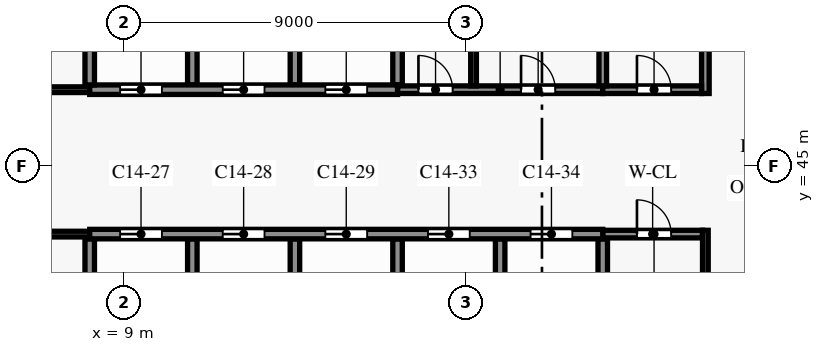
"""IFC4 building model, lengths in metres.
Left out: names, types, materials, properties, quantities, classifications, styles, units other than length and angle.
Written with IfcOpenShell. Run it as: python <this file> out.ifc"""

import sys

from ifc_helpers import new_model, si_unit, direction, frame, frame_2d, origin, place, context, subcontext, project, spatial, rectangle, extrude, element, fill, save


model = new_model("IFC4")
c1 = context("Model", 3, precision=1e-05, world=origin(), true_north=direction((0.0, 1.0)))
c2 = subcontext(c1, "Body", "Model", "MODEL_VIEW")
j1 = project(units=[si_unit("LENGTHUNIT", "METRE"), si_unit("PLANEANGLEUNIT", "RADIAN")], contexts=[c1])
p1 = place(None, origin())
s1 = spatial("IfcSite", under=j1, at=p1, CompositionType="ELEMENT")
p2 = place(p1, origin())
s2 = spatial("IfcBuilding", under=s1, at=p2, CompositionType="ELEMENT")
p3 = place(p2, frame((0.0, 0.0, 92.3)))
s3 = spatial("IfcBuildingStorey", under=s2, at=p3, CompositionType="ELEMENT", Elevation=92.3)
p4 = place(p3, frame((21.6, 43.2, 0.0), z_axis=(0.0, 0.0, 1.0), x_axis=(1.0, 0.0, 0.0)))
e1 = element("IfcWall", 1, at=p4, inside=s3, PredefinedType="PARTITIONING", context=c2, shape_type="SweptSolid", body=[
    extrude(rectangle(XDim=2.625, YDim=0.2, at=frame_2d((1.312, 0.0))), origin(), (0.0, 0.0, 1.0), 3.5),
])
p5 = place(p4, frame((0.9, 0.0, 0.0)))
e2 = element("IfcOpeningElement", 2, at=p5, cuts=e1, PredefinedType="OPENING", context=c2, shape_type="SweptSolid", body=[
    extrude(rectangle(XDim=0.9, YDim=2.1, at=frame_2d((0.45, 1.05))), frame((0.0, 0.11, 0.0), z_axis=(0.0, -1.0, 0.0), x_axis=(1.0, 0.0, 0.0)), (0.0, 0.0, 1.0), 0.22),
])
p6 = place(p3, frame((0.15, 43.2, 0.0), z_axis=(0.0, 0.0, 1.0), x_axis=(1.0, 0.0, 0.0)))
e3 = element("IfcWall", 3, at=p6, inside=s3, PredefinedType="PARTITIONING", context=c2, shape_type="SweptSolid", body=[
    extrude(rectangle(XDim=7.95, YDim=0.15, at=frame_2d((3.975, 0.0))), origin(), (0.0, 0.0, 1.0), 3.5),
])
p7 = place(p6, frame((0.725, 0.0, 0.0)))
e4 = element("IfcOpeningElement", 4, at=p7, cuts=e3, PredefinedType="OPENING", context=c2, shape_type="SweptSolid", body=[
    extrude(rectangle(XDim=0.9, YDim=2.1, at=frame_2d((0.45, 1.05))), frame((0.0, 0.085, 0.0), z_axis=(0.0, -1.0, 0.0), x_axis=(1.0, 0.0, 0.0)), (0.0, 0.0, 1.0), 0.17),
])
p8 = place(p6, frame((4.45, 0.0, 0.0)))
e5 = element("IfcOpeningElement", 5, at=p8, cuts=e3, PredefinedType="OPENING", context=c2, shape_type="SweptSolid", body=[
    extrude(rectangle(XDim=0.9, YDim=2.1, at=frame_2d((0.45, 1.05))), frame((0.0, 0.085, 0.0), z_axis=(0.0, -1.0, 0.0), x_axis=(1.0, 0.0, 0.0)), (0.0, 0.0, 1.0), 0.17),
])
p9 = place(p3, frame((8.1, 43.2, 0.0), z_axis=(0.0, 0.0, 1.0), x_axis=(1.0, 0.0, 0.0)))
e6 = element("IfcWall", 6, at=p9, inside=s3, PredefinedType="SHEAR", context=c2, shape_type="SweptSolid", body=[
    extrude(rectangle(XDim=13.5, YDim=0.25, at=frame_2d((6.75, 0.0))), origin(), (0.0, 0.0, 1.0), 3.5),
])
p10 = place(p9, frame((0.8, 0.0, 0.0)))
e7 = element("IfcOpeningElement", 7, at=p10, cuts=e6, PredefinedType="OPENING", context=c2, shape_type="SweptSolid", body=[
    extrude(rectangle(XDim=1.1, YDim=2.1, at=frame_2d((0.55, 1.05))), frame((0.0, 0.135, 0.0), z_axis=(0.0, -1.0, 0.0), x_axis=(1.0, 0.0, 0.0)), (0.0, 0.0, 1.0), 0.27),
])
p11 = place(p9, frame((3.5, 0.0, 0.0)))
e8 = element("IfcOpeningElement", 8, at=p11, cuts=e6, PredefinedType="OPENING", context=c2, shape_type="SweptSolid", body=[
    extrude(rectangle(XDim=1.1, YDim=2.1, at=frame_2d((0.55, 1.05))), frame((0.0, 0.135, 0.0), z_axis=(0.0, -1.0, 0.0), x_axis=(1.0, 0.0, 0.0)), (0.0, 0.0, 1.0), 0.27),
])
p12 = place(p9, frame((6.2, 0.0, 0.0)))
e9 = element("IfcOpeningElement", 9, at=p12, cuts=e6, PredefinedType="OPENING", context=c2, shape_type="SweptSolid", body=[
    extrude(rectangle(XDim=1.1, YDim=2.1, at=frame_2d((0.55, 1.05))), frame((0.0, 0.135, 0.0), z_axis=(0.0, -1.0, 0.0), x_axis=(1.0, 0.0, 0.0)), (0.0, 0.0, 1.0), 0.27),
])
p13 = place(p9, frame((8.9, 0.0, 0.0)))
e10 = element("IfcOpeningElement", 10, at=p13, cuts=e6, PredefinedType="OPENING", context=c2, shape_type="SweptSolid", body=[
    extrude(rectangle(XDim=1.1, YDim=2.1, at=frame_2d((0.55, 1.05))), frame((0.0, 0.135, 0.0), z_axis=(0.0, -1.0, 0.0), x_axis=(1.0, 0.0, 0.0)), (0.0, 0.0, 1.0), 0.27),
])
p14 = place(p9, frame((11.6, 0.0, 0.0)))
e11 = element("IfcOpeningElement", 11, at=p14, cuts=e6, PredefinedType="OPENING", context=c2, shape_type="SweptSolid", body=[
    extrude(rectangle(XDim=1.1, YDim=2.1, at=frame_2d((0.55, 1.05))), frame((0.0, 0.135, 0.0), z_axis=(0.0, -1.0, 0.0), x_axis=(1.0, 0.0, 0.0)), (0.0, 0.0, 1.0), 0.27),
])
p15 = place(p3, frame((16.2, 47.0, 0.0), z_axis=(0.0, 0.0, 1.0), x_axis=(1.0, 0.0, 0.0)))
e12 = element("IfcWall", 12, at=p15, inside=s3, PredefinedType="PARTITIONING", context=c2, shape_type="SweptSolid", body=[
    extrude(rectangle(XDim=5.4, YDim=0.2, at=frame_2d((2.7, 0.0))), origin(), (0.0, 0.0, 1.0), 3.5),
])
p16 = place(p15, frame((0.55, 0.0, 0.0)))
e13 = element("IfcOpeningElement", 13, at=p16, cuts=e12, PredefinedType="OPENING", context=c2, shape_type="SweptSolid", body=[
    extrude(rectangle(XDim=0.9, YDim=2.1, at=frame_2d((0.45, 1.05))), frame((0.0, 0.11, 0.0), z_axis=(0.0, -1.0, 0.0), x_axis=(1.0, 0.0, 0.0)), (0.0, 0.0, 1.0), 0.22),
])
p17 = place(p15, frame((3.25, 0.0, 0.0)))
e14 = element("IfcOpeningElement", 14, at=p17, cuts=e12, PredefinedType="OPENING", context=c2, shape_type="SweptSolid", body=[
    extrude(rectangle(XDim=0.9, YDim=2.1, at=frame_2d((0.45, 1.05))), frame((0.0, 0.11, 0.0), z_axis=(0.0, -1.0, 0.0), x_axis=(1.0, 0.0, 0.0)), (0.0, 0.0, 1.0), 0.22),
])
p18 = place(p3, frame((0.15, 47.0, 0.0), z_axis=(0.0, 0.0, 1.0), x_axis=(1.0, 0.0, 0.0)))
e15 = element("IfcWall", 15, at=p18, inside=s3, PredefinedType="PARTITIONING", context=c2, shape_type="SweptSolid", body=[
    extrude(rectangle(XDim=7.95, YDim=0.15, at=frame_2d((3.975, 0.0))), origin(), (0.0, 0.0, 1.0), 3.5),
])
p19 = place(p18, frame((0.725, 0.0, 0.0)))
e16 = element("IfcOpeningElement", 16, at=p19, cuts=e15, PredefinedType="OPENING", context=c2, shape_type="SweptSolid", body=[
    extrude(rectangle(XDim=0.9, YDim=2.1, at=frame_2d((0.45, 1.05))), frame((0.0, 0.085, 0.0), z_axis=(0.0, -1.0, 0.0), x_axis=(1.0, 0.0, 0.0)), (0.0, 0.0, 1.0), 0.17),
])
p20 = place(p18, frame((4.45, 0.0, 0.0)))
e17 = element("IfcOpeningElement", 17, at=p20, cuts=e15, PredefinedType="OPENING", context=c2, shape_type="SweptSolid", body=[
    extrude(rectangle(XDim=0.9, YDim=2.1, at=frame_2d((0.45, 1.05))), frame((0.0, 0.085, 0.0), z_axis=(0.0, -1.0, 0.0), x_axis=(1.0, 0.0, 0.0)), (0.0, 0.0, 1.0), 0.17),
])
p21 = place(p3, frame((21.6, 47.0, 0.0), z_axis=(0.0, 0.0, 1.0), x_axis=(1.0, 0.0, 0.0)))
e18 = element("IfcWall", 18, at=p21, inside=s3, PredefinedType="PARTITIONING", context=c2, shape_type="SweptSolid", body=[
    extrude(rectangle(XDim=2.6, YDim=0.2, at=frame_2d((1.3, 0.0))), origin(), (0.0, 0.0, 1.0), 3.5),
])
p22 = place(p21, frame((0.9, 0.0, 0.0)))
e19 = element("IfcOpeningElement", 19, at=p22, cuts=e18, PredefinedType="OPENING", context=c2, shape_type="SweptSolid", body=[
    extrude(rectangle(XDim=0.9, YDim=2.1, at=frame_2d((0.45, 1.05))), frame((0.0, 0.11, 0.0), z_axis=(0.0, -1.0, 0.0), x_axis=(1.0, 0.0, 0.0)), (0.0, 0.0, 1.0), 0.22),
])
p23 = place(p3, frame((8.1, 47.0, 0.0), z_axis=(0.0, 0.0, 1.0), x_axis=(1.0, 0.0, 0.0)))
e20 = element("IfcWall", 20, at=p23, inside=s3, PredefinedType="SHEAR", context=c2, shape_type="SweptSolid", body=[
    extrude(rectangle(XDim=8.1, YDim=0.25, at=frame_2d((4.05, 0.0))), origin(), (0.0, 0.0, 1.0), 3.5),
])
p24 = place(p23, frame((0.8, 0.0, 0.0)))
e21 = element("IfcOpeningElement", 21, at=p24, cuts=e20, PredefinedType="OPENING", context=c2, shape_type="SweptSolid", body=[
    extrude(rectangle(XDim=1.1, YDim=2.1, at=frame_2d((0.55, 1.05))), frame((0.0, 0.135, 0.0), z_axis=(0.0, -1.0, 0.0), x_axis=(1.0, 0.0, 0.0)), (0.0, 0.0, 1.0), 0.27),
])
p25 = place(p23, frame((3.5, 0.0, 0.0)))
e22 = element("IfcOpeningElement", 22, at=p25, cuts=e20, PredefinedType="OPENING", context=c2, shape_type="SweptSolid", body=[
    extrude(rectangle(XDim=1.1, YDim=2.1, at=frame_2d((0.55, 1.05))), frame((0.0, 0.135, 0.0), z_axis=(0.0, -1.0, 0.0), x_axis=(1.0, 0.0, 0.0)), (0.0, 0.0, 1.0), 0.27),
])
p26 = place(p23, frame((6.2, 0.0, 0.0)))
e23 = element("IfcOpeningElement", 23, at=p26, cuts=e20, PredefinedType="OPENING", context=c2, shape_type="SweptSolid", body=[
    extrude(rectangle(XDim=1.1, YDim=2.1, at=frame_2d((0.55, 1.05))), frame((0.0, 0.135, 0.0), z_axis=(0.0, -1.0, 0.0), x_axis=(1.0, 0.0, 0.0)), (0.0, 0.0, 1.0), 0.27),
])
for number, where, z_axis, x_axis in (
    (24, (8.1, 40.125, 0.0), (0.0, 0.0, 1.0), (0.0, 1.0, 0.0)),
    (25, (8.1, 47.125, 0.0), (0.0, 0.0, 1.0), (0.0, 1.0, 0.0)),
    (26, (10.8, 40.125, 0.0), (0.0, 0.0, 1.0), (0.0, 1.0, 0.0)),
    (27, (10.8, 47.125, 0.0), (0.0, 0.0, 1.0), (0.0, 1.0, 0.0)),
    (28, (13.5, 40.125, 0.0), (0.0, 0.0, 1.0), (0.0, 1.0, 0.0)),
    (29, (13.5, 47.125, 0.0), (0.0, 0.0, 1.0), (0.0, 1.0, 0.0)),
    (30, (16.2, 40.125, 0.0), (0.0, 0.0, 1.0), (0.0, 1.0, 0.0)),
):
    element("IfcWall", number, at=place(p3, frame(where, z_axis=z_axis, x_axis=x_axis)), inside=s3, PredefinedType="SHEAR", context=c2, shape_type="SweptSolid", body=[
        extrude(rectangle(XDim=2.95, YDim=0.25, at=frame_2d((1.475, 0.0))), origin(), (0.0, 0.0, 1.0), 3.5),
    ])
p27 = place(p3, frame((16.2, 47.125, 0.0), z_axis=(0.0, 0.0, 1.0), x_axis=(0.0, 1.0, 0.0)))
e31 = element("IfcWall", 31, at=p27, inside=s3, PredefinedType="SHEAR", context=c2, shape_type="SweptSolid", body=[
    extrude(rectangle(XDim=3.075, YDim=0.25, at=frame_2d((1.538, 0.0))), origin(), (0.0, 0.0, 1.0), 3.5),
])
p28 = place(p3, frame((18.2, 47.1, 0.0), z_axis=(0.0, 0.0, 1.0), x_axis=(0.0, 1.0, 0.0)))
e32 = element("IfcWall", 32, at=p28, inside=s3, PredefinedType="PARTITIONING", context=c2, shape_type="SweptSolid", body=[
    extrude(rectangle(XDim=4.625, YDim=0.15, at=frame_2d((2.312, 0.0))), origin(), (0.0, 0.0, 1.0), 3.5),
])
p29 = place(p3, frame((18.9, 40.125, 0.0), z_axis=(0.0, 0.0, 1.0), x_axis=(0.0, 1.0, 0.0)))
e33 = element("IfcWall", 33, at=p29, inside=s3, PredefinedType="SHEAR", context=c2, shape_type="SweptSolid", body=[
    extrude(rectangle(XDim=2.95, YDim=0.25, at=frame_2d((1.475, 0.0))), origin(), (0.0, 0.0, 1.0), 3.5),
])
p30 = place(p3, frame((21.6, 47.1, 0.0), z_axis=(0.0, 0.0, 1.0), x_axis=(0.0, 1.0, 0.0)))
e34 = element("IfcWall", 34, at=p30, inside=s3, PredefinedType="PARTITIONING", context=c2, shape_type="SweptSolid", body=[
    extrude(rectangle(XDim=4.6, YDim=0.2, at=frame_2d((2.3, 0.0))), origin(), (0.0, 0.0, 1.0), 3.5),
])
p31 = place(p3, frame((21.6, 40.125, 0.0), z_axis=(0.0, 0.0, 1.0), x_axis=(0.0, 1.0, 0.0)))
e35 = element("IfcWall", 35, at=p31, inside=s3, PredefinedType="SHEAR", context=c2, shape_type="SweptSolid", body=[
    extrude(rectangle(XDim=2.95, YDim=0.25, at=frame_2d((1.475, 0.0))), origin(), (0.0, 0.0, 1.0), 3.5),
])
p32 = place(p3, frame((24.3, 35.925, 0.0), z_axis=(0.0, 0.0, 1.0), x_axis=(0.0, 1.0, 0.0)))
e36 = element("IfcWall", 36, at=p32, inside=s3, PredefinedType="PARTITIONING", context=c2, shape_type="SweptSolid", body=[
    extrude(rectangle(XDim=7.375, YDim=0.15, at=frame_2d((3.688, 0.0))), origin(), (0.0, 0.0, 1.0), 3.5),
])
p33 = place(p3, frame((24.3, 46.9, 0.0), z_axis=(0.0, 0.0, 1.0), x_axis=(0.0, 1.0, 0.0)))
e37 = element("IfcWall", 37, at=p33, inside=s3, PredefinedType="SHEAR", context=c2, shape_type="SweptSolid", body=[
    extrude(rectangle(XDim=5.0, YDim=0.2, at=frame_2d((2.5, 0.0))), origin(), (0.0, 0.0, 1.0), 3.5),
])
p34 = place(p22, origin())
e38 = element("IfcDoor", 38, at=p34, inside=s3, OperationType="SINGLE_SWING_LEFT", PredefinedType="DOOR", context=c2, shape_type="SweptSolid", body=[
    extrude(rectangle(XDim=0.9, YDim=2.1, at=frame_2d((0.45, 1.05))), frame((0.0, 0.025, 0.0), z_axis=(0.0, -1.0, 0.0), x_axis=(1.0, 0.0, 0.0)), (0.0, 0.0, 1.0), 0.05),
])
fill(e19, e38)
p35 = place(p16, origin())
e39 = element("IfcDoor", 39, at=p35, inside=s3, OperationType="SINGLE_SWING_LEFT", PredefinedType="DOOR", context=c2, shape_type="SweptSolid", body=[
    extrude(rectangle(XDim=0.9, YDim=2.1, at=frame_2d((0.45, 1.05))), frame((0.0, 0.025, 0.0), z_axis=(0.0, -1.0, 0.0), x_axis=(1.0, 0.0, 0.0)), (0.0, 0.0, 1.0), 0.05),
])
fill(e13, e39)
p36 = place(p17, origin())
e40 = element("IfcDoor", 40, at=p36, inside=s3, OperationType="SINGLE_SWING_RIGHT", PredefinedType="DOOR", context=c2, shape_type="SweptSolid", body=[
    extrude(rectangle(XDim=0.9, YDim=2.1, at=frame_2d((0.45, 1.05))), frame((0.0, 0.025, 0.0), z_axis=(0.0, -1.0, 0.0), x_axis=(1.0, 0.0, 0.0)), (0.0, 0.0, 1.0), 0.05),
])
fill(e14, e40)
p37 = place(p5, origin())
e41 = element("IfcDoor", 41, at=p37, inside=s3, OperationType="SINGLE_SWING_RIGHT", PredefinedType="DOOR", context=c2, shape_type="SweptSolid", body=[
    extrude(rectangle(XDim=0.9, YDim=2.1, at=frame_2d((0.45, 1.05))), frame((0.0, 0.025, 0.0), z_axis=(0.0, -1.0, 0.0), x_axis=(1.0, 0.0, 0.0)), (0.0, 0.0, 1.0), 0.05),
])
fill(e2, e41)
p38 = place(p10, origin())
e42 = element("IfcDoor", 42, at=p38, inside=s3, OperationType="DOUBLE_DOOR_SLIDING", PredefinedType="DOOR", context=c2, shape_type="SweptSolid", body=[
    extrude(rectangle(XDim=1.1, YDim=2.1, at=frame_2d((0.55, 1.05))), frame((0.0, 0.025, 0.0), z_axis=(0.0, -1.0, 0.0), x_axis=(1.0, 0.0, 0.0)), (0.0, 0.0, 1.0), 0.05),
])
fill(e7, e42)
p39 = place(p11, origin())
e43 = element("IfcDoor", 43, at=p39, inside=s3, OperationType="DOUBLE_DOOR_SLIDING", PredefinedType="DOOR", context=c2, shape_type="SweptSolid", body=[
    extrude(rectangle(XDim=1.1, YDim=2.1, at=frame_2d((0.55, 1.05))), frame((0.0, 0.025, 0.0), z_axis=(0.0, -1.0, 0.0), x_axis=(1.0, 0.0, 0.0)), (0.0, 0.0, 1.0), 0.05),
])
fill(e8, e43)
p40 = place(p12, origin())
e44 = element("IfcDoor", 44, at=p40, inside=s3, OperationType="DOUBLE_DOOR_SLIDING", PredefinedType="DOOR", context=c2, shape_type="SweptSolid", body=[
    extrude(rectangle(XDim=1.1, YDim=2.1, at=frame_2d((0.55, 1.05))), frame((0.0, 0.025, 0.0), z_axis=(0.0, -1.0, 0.0), x_axis=(1.0, 0.0, 0.0)), (0.0, 0.0, 1.0), 0.05),
])
fill(e9, e44)
p41 = place(p24, origin())
e45 = element("IfcDoor", 45, at=p41, inside=s3, OperationType="DOUBLE_DOOR_SLIDING", PredefinedType="DOOR", context=c2, shape_type="SweptSolid", body=[
    extrude(rectangle(XDim=1.1, YDim=2.1, at=frame_2d((0.55, 1.05))), frame((0.0, 0.025, 0.0), z_axis=(0.0, -1.0, 0.0), x_axis=(1.0, 0.0, 0.0)), (0.0, 0.0, 1.0), 0.05),
])
fill(e21, e45)
p42 = place(p25, origin())
e46 = element("IfcDoor", 46, at=p42, inside=s3, OperationType="DOUBLE_DOOR_SLIDING", PredefinedType="DOOR", context=c2, shape_type="SweptSolid", body=[
    extrude(rectangle(XDim=1.1, YDim=2.1, at=frame_2d((0.55, 1.05))), frame((0.0, 0.025, 0.0), z_axis=(0.0, -1.0, 0.0), x_axis=(1.0, 0.0, 0.0)), (0.0, 0.0, 1.0), 0.05),
])
fill(e22, e46)
p43 = place(p26, origin())
e47 = element("IfcDoor", 47, at=p43, inside=s3, OperationType="DOUBLE_DOOR_SLIDING", PredefinedType="DOOR", context=c2, shape_type="SweptSolid", body=[
    extrude(rectangle(XDim=1.1, YDim=2.1, at=frame_2d((0.55, 1.05))), frame((0.0, 0.025, 0.0), z_axis=(0.0, -1.0, 0.0), x_axis=(1.0, 0.0, 0.0)), (0.0, 0.0, 1.0), 0.05),
])
fill(e23, e47)
p44 = place(p13, origin())
e48 = element("IfcDoor", 48, at=p44, inside=s3, OperationType="DOUBLE_DOOR_SLIDING", PredefinedType="DOOR", context=c2, shape_type="SweptSolid", body=[
    extrude(rectangle(XDim=1.1, YDim=2.1, at=frame_2d((0.55, 1.05))), frame((0.0, 0.025, 0.0), z_axis=(0.0, -1.0, 0.0), x_axis=(1.0, 0.0, 0.0)), (0.0, 0.0, 1.0), 0.05),
])
fill(e10, e48)
p45 = place(p14, origin())
e49 = element("IfcDoor", 49, at=p45, inside=s3, OperationType="DOUBLE_DOOR_SLIDING", PredefinedType="DOOR", context=c2, shape_type="SweptSolid", body=[
    extrude(rectangle(XDim=1.1, YDim=2.1, at=frame_2d((0.55, 1.05))), frame((0.0, 0.025, 0.0), z_axis=(0.0, -1.0, 0.0), x_axis=(1.0, 0.0, 0.0)), (0.0, 0.0, 1.0), 0.05),
])
fill(e11, e49)
save(model, sys.argv[1])
